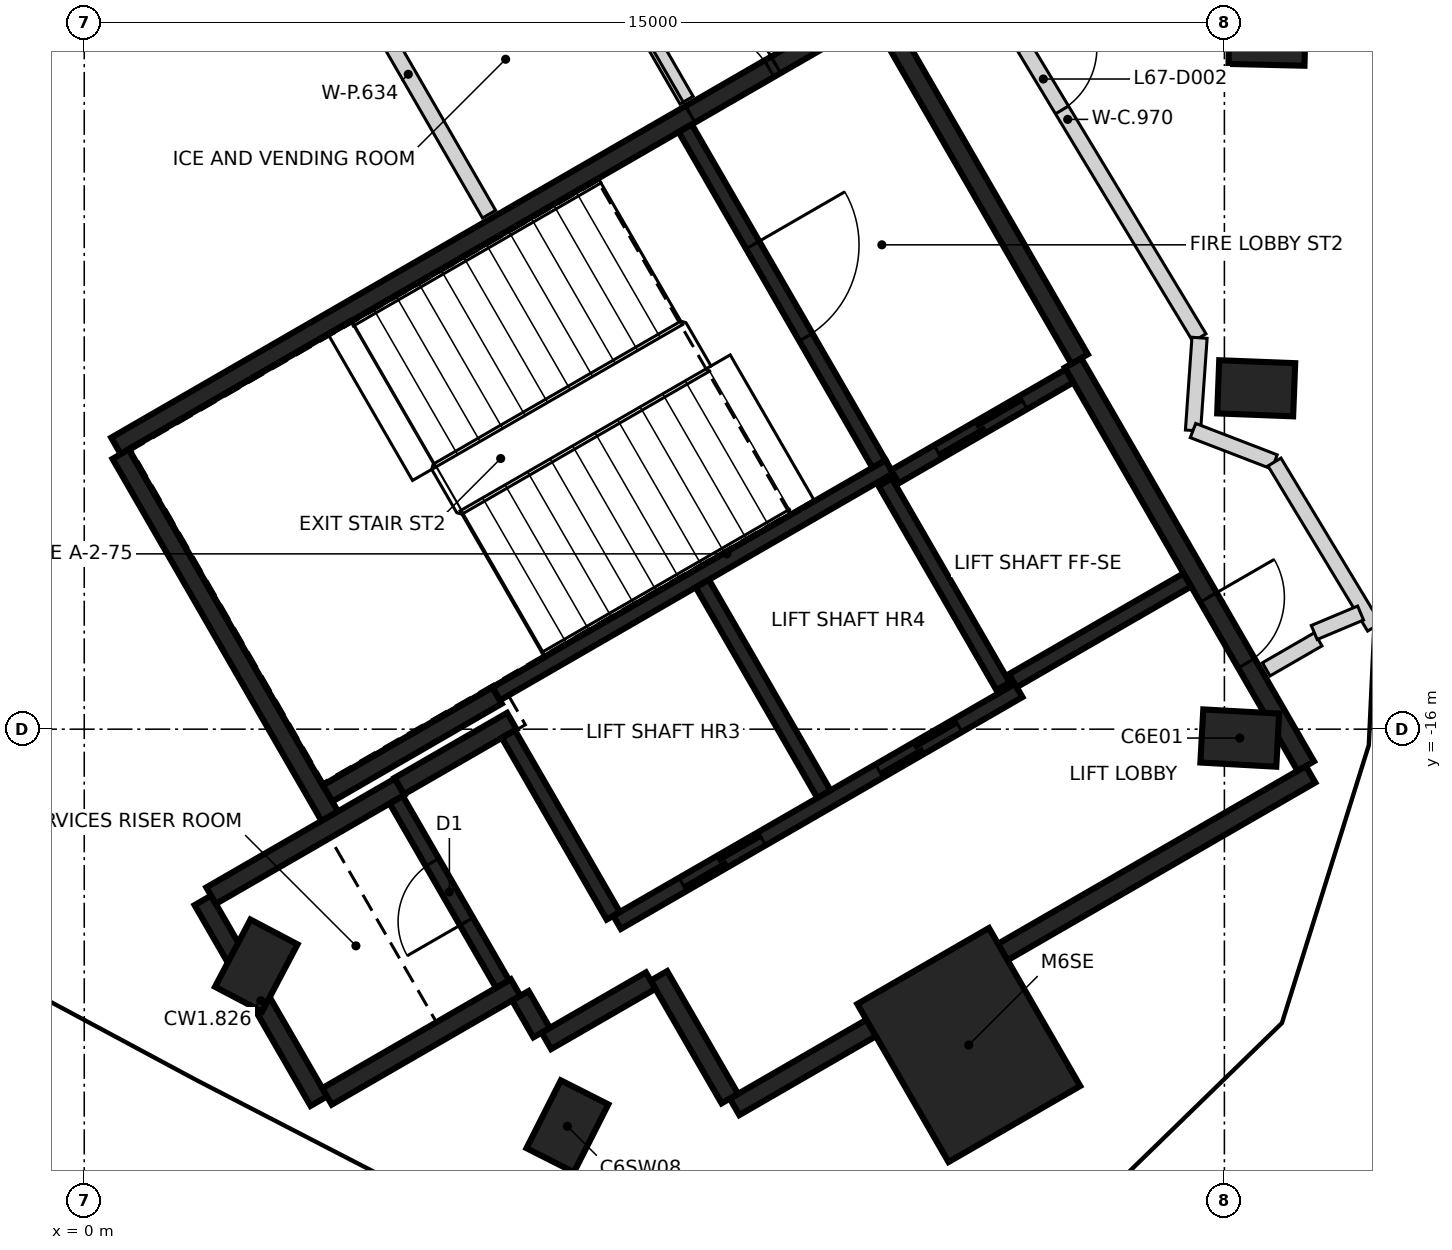
"""IFC4 building model, lengths in metres.
Left out: names, types, materials, properties, quantities, classifications, styles, units other than length and angle.
Written with IfcOpenShell. Run it as: python <this file> out.ifc"""

import sys

from ifc_helpers import new_model, si_unit, direction, frame, frame_2d, origin, origin_2d, place, context, subcontext, project, spatial, rectangle, extrude, element, fill, save


model = new_model("IFC4")
c1 = context("Model", 3, precision=1e-05, world=origin(), true_north=direction((0.0, 1.0)))
c2 = subcontext(c1, "Body", "Model", "MODEL_VIEW")
j1 = project(units=[si_unit("LENGTHUNIT", "METRE"), si_unit("PLANEANGLEUNIT", "RADIAN")], contexts=[c1])
p1 = place(None, origin())
s1 = spatial("IfcSite", under=j1, at=p1, CompositionType="ELEMENT")
p2 = place(p1, origin())
s2 = spatial("IfcBuilding", under=s1, at=p2, CompositionType="ELEMENT")
p3 = place(p2, frame((0.0, 0.0, 265.8)))
s3 = spatial("IfcBuildingStorey", under=s2, at=p3, CompositionType="ELEMENT", Elevation=265.8)
for number, where, z_axis, x_axis in (
    (1, (15.202, -16.117, -0.35), (0.0, 0.0, 1.0), (-0.998, 0.055, 0.0)),
    (2, (15.418, -11.515, -0.35), (0.0, 0.0, 1.0), (-0.999, 0.039, 0.0)),
    (3, (15.562, -6.91, -0.35), (0.0, 0.0, 1.0), (-1.0, 0.024, 0.0)),
    (4, (2.263, -19.11, -0.35), (0.0, 0.0, 1.0), (0.466, 0.885, 0.0)),
    (5, (6.356, -21.224, -0.35), (0.0, 0.0, 1.0), (0.452, 0.892, 0.0)),
):
    element("IfcColumn", number, at=place(p3, frame(where, z_axis=z_axis, x_axis=x_axis)), inside=s3, PredefinedType="COLUMN", context=c2, shape_type="SweptSolid", body=[
        extrude(rectangle(XDim=1.0, YDim=0.7, at=origin_2d()), origin(), (0.0, 0.0, 1.0), 3.6),
    ])
p4 = place(p3, frame((11.637, -20.155, -0.35), z_axis=(0.0, 0.0, 1.0), x_axis=(-0.5, 0.866025403784, 0.0)))
e6 = element("IfcColumn", 6, at=p4, inside=s3, PredefinedType="COLUMN", context=c2, shape_type="SweptSolid", body=[
    extrude(rectangle(XDim=2.4, YDim=2.0, at=origin_2d()), origin(), (0.0, 0.0, 1.0), 3.6),
])
p5 = place(p3, frame((0.417, -12.273, 0.0), z_axis=(0.0, 0.0, 1.0), x_axis=(0.866021906294, 0.500006057782, 0.0)))
e7 = element("IfcWall", 7, at=p5, inside=s3, PredefinedType="SHEAR", context=c2, shape_type="SweptSolid", body=[
    extrude(rectangle(XDim=11.55, YDim=0.25, at=frame_2d((5.775, 0.0))), origin(), (0.0, 0.0, 1.0), 3.25),
])
p6 = place(p5, frame((10.025, 0.0, 0.0)))
e8 = element("IfcOpeningElement", 8, at=p6, cuts=e7, PredefinedType="OPENING", context=c2, shape_type="SweptSolid", body=[
    extrude(rectangle(XDim=1.2, YDim=2.1, at=frame_2d((0.6, 1.05))), frame((0.0, 0.135, 0.0), z_axis=(0.0, -1.0, 0.0), x_axis=(1.0, 0.0, 0.0)), (0.0, 0.0, 1.0), 0.27),
])
p7 = place(p5, frame((8.725, 0.0, 0.0)))
e9 = element("IfcOpeningElement", 9, at=p7, cuts=e7, PredefinedType="OPENING", context=c2, shape_type="SweptSolid", body=[
    extrude(rectangle(XDim=1.2, YDim=2.1, at=frame_2d((0.6, 1.05))), frame((0.0, 0.135, 0.0), z_axis=(0.0, -1.0, 0.0), x_axis=(1.0, 0.0, 0.0)), (0.0, 0.0, 1.0), 0.27),
])
p8 = place(p3, frame((16.133, -16.594, 0.0), z_axis=(0.0, 0.0, 1.0), x_axis=(-0.866022959057, -0.500004234368, 0.0)))
e10 = element("IfcWall", 10, at=p8, inside=s3, PredefinedType="SHEAR", context=c2, shape_type="SweptSolid", body=[
    extrude(rectangle(XDim=8.75, YDim=0.25, at=frame_2d((4.375, 0.0))), origin(), (0.0, 0.0, 1.0), 3.25),
])
p9 = place(p3, frame((13.008, -11.181, 0.0), z_axis=(0.0, 0.0, 1.0), x_axis=(0.500001955336, -0.866024274868, 0.0)))
e11 = element("IfcWall", 11, at=p9, inside=s3, PredefinedType="SHEAR", context=c2, shape_type="SweptSolid", body=[
    extrude(rectangle(XDim=6.125, YDim=0.25, at=frame_2d((3.062, 0.0))), origin(), (0.0, 0.0, 1.0), 3.25),
])
p10 = place(p9, frame((3.563, 0.0, 0.0)))
e12 = element("IfcOpeningElement", 12, at=p10, cuts=e11, PredefinedType="OPENING", context=c2, shape_type="SweptSolid", body=[
    extrude(rectangle(XDim=1.0, YDim=2.1, at=frame_2d((0.5, 1.05))), frame((0.0, 0.135, 0.0), z_axis=(0.0, -1.0, 0.0), x_axis=(1.0, 0.0, 0.0)), (0.0, 0.0, 1.0), 0.27),
])
p11 = place(p3, frame((3.235, -17.153, 0.0), z_axis=(0.0, 0.0, 1.0), x_axis=(-0.500008851346, 0.866020293397, 0.0)))
e13 = element("IfcWall", 13, at=p11, inside=s3, PredefinedType="SHEAR", context=c2, shape_type="SweptSolid", body=[
    extrude(rectangle(XDim=5.51, YDim=0.25, at=frame_2d((2.755, 0.0))), origin(), (0.0, 0.0, 1.0), 3.25),
])
p12 = place(p3, frame((10.483, -6.606, 0.0), z_axis=(0.0, 0.0, 1.0), x_axis=(0.49999885962, -0.866026062182, 0.0)))
e14 = element("IfcWall", 14, at=p12, inside=s3, PredefinedType="SHEAR", context=c2, shape_type="SweptSolid", body=[
    extrude(rectangle(XDim=5.225, YDim=0.25, at=frame_2d((2.612, 0.0))), origin(), (0.0, 0.0, 1.0), 3.25),
])
p13 = place(p3, frame((3.085, -20.894, 0.0), z_axis=(0.0, 0.0, 1.0), x_axis=(-0.499978833458, 0.866037623948, 0.0)))
e15 = element("IfcWall", 15, at=p13, inside=s3, PredefinedType="SHEAR", context=c2, shape_type="SweptSolid", body=[
    extrude(rectangle(XDim=3.05, YDim=0.25, at=frame_2d((1.525, 0.0))), origin(), (0.0, 0.0, 1.0), 3.25),
])
p14 = place(p3, frame((1.669, -18.19, 0.0), z_axis=(0.0, 0.0, 1.0), x_axis=(0.866042235819, 0.499970844928, 0.0)))
e16 = element("IfcWall", 16, at=p14, inside=s3, PredefinedType="SHEAR", context=c2, shape_type="SweptSolid", body=[
    extrude(rectangle(XDim=2.865, YDim=0.25, at=frame_2d((1.432, 0.0))), origin(), (0.0, 0.0, 1.0), 3.25),
])
p15 = place(p3, frame((5.675, -19.399, 0.0), z_axis=(0.0, 0.0, 1.0), x_axis=(-0.866026637627, -0.499997862916, 0.0)))
e17 = element("IfcWall", 17, at=p15, inside=s3, PredefinedType="SHEAR", context=c2, shape_type="SweptSolid", body=[
    extrude(rectangle(XDim=2.865, YDim=0.25, at=frame_2d((1.432, 0.0))), origin(), (0.0, 0.0, 1.0), 3.25),
])
p16 = place(p3, frame((5.431, -15.556, 0.0), z_axis=(0.0, 0.0, 1.0), x_axis=(-0.866022940537, -0.500004266446, 0.0)))
e18 = element("IfcWall", 18, at=p16, inside=s3, PredefinedType="SHEAR", context=c2, shape_type="SweptSolid", body=[
    extrude(rectangle(XDim=2.575, YDim=0.25, at=frame_2d((1.287, 0.0))), origin(), (0.0, 0.0, 1.0), 3.25),
])
p17 = place(p3, frame((8.493, -20.86, 0.0), z_axis=(0.0, 0.0, 1.0), x_axis=(-0.500039802285, 0.866002422705, 0.0)))
e19 = element("IfcWall", 19, at=p17, inside=s3, PredefinedType="SHEAR", context=c2, shape_type="SweptSolid", body=[
    extrude(rectangle(XDim=1.865, YDim=0.25, at=frame_2d((0.932, 0.0))), origin(), (0.0, 0.0, 1.0), 3.25),
])
p18 = place(p3, frame((4.145, -16.749, 0.0), z_axis=(0.0, 0.0, 1.0), x_axis=(0.866038183914, 0.499977863513, 0.0)))
e20 = element("IfcWall", 20, at=p18, inside=s3, PredefinedType="SHEAR", context=c2, shape_type="SweptSolid", body=[
    extrude(rectangle(XDim=1.71, YDim=0.25, at=frame_2d((0.855, 0.0))), origin(), (0.0, 0.0, 1.0), 3.25),
])
p19 = place(p3, frame((7.452, -19.308, 0.0), z_axis=(0.0, 0.0, 1.0), x_axis=(-0.866044474677, -0.49996696679, 0.0)))
e21 = element("IfcWall", 21, at=p19, inside=s3, PredefinedType="SHEAR", context=c2, shape_type="SweptSolid", body=[
    extrude(rectangle(XDim=1.584, YDim=0.25, at=frame_2d((0.792, 0.0))), origin(), (0.0, 0.0, 1.0), 3.25),
])
p20 = place(p3, frame((6.017, -19.992, 0.0), z_axis=(0.0, 0.0, 1.0), x_axis=(-0.500364886717, 0.865814633822, 0.0)))
e22 = element("IfcWall", 22, at=p20, inside=s3, PredefinedType="SHEAR", context=c2, shape_type="SweptSolid", body=[
    extrude(rectangle(XDim=0.559, YDim=0.25, at=frame_2d((0.28, 0.0))), origin(), (0.0, 0.0, 1.0), 3.25),
])
p21 = place(p3, frame((5.419, -15.534, 0.0), z_axis=(0.0, 0.0, 1.0), x_axis=(0.866029065029, 0.499993658486, 0.0)))
e23 = element("IfcWall", 23, at=p21, inside=s3, PredefinedType="SHEAR", context=c2, shape_type="SweptSolid", body=[
    extrude(rectangle(XDim=5.974, YDim=0.2, at=frame_2d((2.987, 0.0))), origin(), (0.0, 0.0, 1.0), 3.25),
])
p22 = place(p3, frame((7.01, -18.542, 0.0), z_axis=(0.0, 0.0, 1.0), x_axis=(0.866030299012, 0.499991521122, 0.0)))
e24 = element("IfcWall", 24, at=p22, inside=s3, PredefinedType="SHEAR", context=c2, shape_type="SweptSolid", body=[
    extrude(rectangle(XDim=6.1, YDim=0.2, at=frame_2d((3.05, 0.0))), origin(), (0.0, 0.0, 1.0), 3.25),
])
p23 = place(p22, frame((1.0, 0.0, 0.0)))
e25 = element("IfcOpeningElement", 25, at=p23, cuts=e24, PredefinedType="OPENING", context=c2, shape_type="SweptSolid", body=[
    extrude(rectangle(XDim=1.2, YDim=2.1, at=frame_2d((0.6, 1.05))), frame((0.0, 0.11, 0.0), z_axis=(0.0, -1.0, 0.0), x_axis=(1.0, 0.0, 0.0)), (0.0, 0.0, 1.0), 0.22),
])
p24 = place(p22, frame((3.982, 0.0, 0.0)))
e26 = element("IfcOpeningElement", 26, at=p24, cuts=e24, PredefinedType="OPENING", context=c2, shape_type="SweptSolid", body=[
    extrude(rectangle(XDim=1.2, YDim=2.1, at=frame_2d((0.6, 1.05))), frame((0.0, 0.11, 0.0), z_axis=(0.0, -1.0, 0.0), x_axis=(1.0, 0.0, 0.0)), (0.0, 0.0, 1.0), 0.22),
])
p25 = place(p3, frame((7.906, -8.094, 0.0), z_axis=(0.0, 0.0, 1.0), x_axis=(0.500027839223, -0.866009330205, 0.0)))
e27 = element("IfcWall", 27, at=p25, inside=s3, PredefinedType="SHEAR", context=c2, shape_type="SweptSolid", body=[
    extrude(rectangle(XDim=5.098, YDim=0.2, at=frame_2d((2.549, 0.0))), origin(), (0.0, 0.0, 1.0), 3.25),
])
p26 = place(p25, frame((1.774, 0.0, 0.0)))
e28 = element("IfcOpeningElement", 28, at=p26, cuts=e27, PredefinedType="OPENING", context=c2, shape_type="SweptSolid", body=[
    extrude(rectangle(XDim=1.4, YDim=2.1, at=frame_2d((0.7, 1.05))), frame((0.0, 0.11, 0.0), z_axis=(0.0, -1.0, 0.0), x_axis=(1.0, 0.0, 0.0)), (0.0, 0.0, 1.0), 0.22),
])
p27 = place(p3, frame((8.132, -14.084, 0.0), z_axis=(0.0, 0.0, 1.0), x_axis=(0.499997778408, -0.866026686418, 0.0)))
e29 = element("IfcWall", 29, at=p27, inside=s3, PredefinedType="SHEAR", context=c2, shape_type="SweptSolid", body=[
    extrude(rectangle(XDim=3.198, YDim=0.2, at=frame_2d((1.599, 0.0))), origin(), (0.0, 0.0, 1.0), 3.25),
])
p28 = place(p3, frame((5.503, -19.352, 0.0), z_axis=(0.0, 0.0, 1.0), x_axis=(-0.499986818241, 0.866033014143, 0.0)))
e30 = element("IfcWall", 30, at=p28, inside=s3, PredefinedType="SHEAR", context=c2, shape_type="SweptSolid", body=[
    extrude(rectangle(XDim=2.798, YDim=0.2, at=frame_2d((1.399, 0.0))), origin(), (0.0, 0.0, 1.0), 3.25),
])
p29 = place(p28, frame((0.949, 0.0, 0.0)))
e31 = element("IfcOpeningElement", 31, at=p29, cuts=e30, PredefinedType="OPENING", context=c2, shape_type="SweptSolid", body=[
    extrude(rectangle(XDim=0.9, YDim=2.1, at=frame_2d((0.45, 1.05))), frame((0.0, 0.11, 0.0), z_axis=(0.0, -1.0, 0.0), x_axis=(1.0, 0.0, 0.0)), (0.0, 0.0, 1.0), 0.22),
])
p30 = place(p3, frame((6.96, -18.455, 0.0), z_axis=(0.0, 0.0, 1.0), x_axis=(-0.499926705758, 0.866067716099, 0.0)))
e32 = element("IfcWall", 32, at=p30, inside=s3, PredefinedType="SHEAR", context=c2, shape_type="SweptSolid", body=[
    extrude(rectangle(XDim=2.759, YDim=0.2, at=frame_2d((1.38, 0.0))), origin(), (0.0, 0.0, 1.0), 3.25),
])
p31 = place(p3, frame((12.088, -15.437, 0.0), z_axis=(0.0, 0.0, 1.0), x_axis=(-0.500026960575, 0.86600983753, 0.0)))
e33 = element("IfcWall", 33, at=p31, inside=s3, PredefinedType="SHEAR", context=c2, shape_type="SweptSolid", body=[
    extrude(rectangle(XDim=3.1, YDim=0.2, at=frame_2d((1.55, 0.0))), origin(), (0.0, 0.0, 1.0), 3.25),
])
p32 = place(p3, frame((10.666, -12.678, 0.0), z_axis=(0.0, 0.0, 1.0), x_axis=(0.866018407898, 0.500012117035, 0.0)))
e34 = element("IfcWall", 34, at=p32, inside=s3, PredefinedType="SHEAR", context=c2, shape_type="SweptSolid", body=[
    extrude(rectangle(XDim=2.651, YDim=0.2, at=frame_2d((1.325, 0.0))), origin(), (0.0, 0.0, 1.0), 3.25),
])
p33 = place(p32, frame((0.652, 0.0, 0.0)))
e35 = element("IfcOpeningElement", 35, at=p33, cuts=e34, PredefinedType="OPENING", context=c2, shape_type="SweptSolid", body=[
    extrude(rectangle(XDim=1.3, YDim=2.1, at=frame_2d((0.65, 1.05))), frame((0.0, 0.11, 0.0), z_axis=(0.0, -1.0, 0.0), x_axis=(1.0, 0.0, 0.0)), (0.0, 0.0, 1.0), 0.22),
])
p34 = place(p3, frame((14.512, -14.037, 0.0), z_axis=(0.0, 0.0, 1.0), x_axis=(-0.866018407898, -0.500012117035, 0.0)))
e36 = element("IfcWall", 36, at=p34, inside=s3, PredefinedType="SHEAR", context=c2, shape_type="SweptSolid", body=[
    extrude(rectangle(XDim=2.651, YDim=0.2, at=frame_2d((1.325, 0.0))), origin(), (0.0, 0.0, 1.0), 3.25),
])
p35 = place(p3, frame((7.427, -6.864, 0.0), z_axis=(0.0, 0.0, 1.0), x_axis=(0.499942098031, -0.866058830921, 0.0)))
e37 = element("IfcWall", 37, at=p35, inside=s3, PredefinedType="PARTITIONING", context=c2, shape_type="SweptSolid", body=[
    extrude(rectangle(XDim=0.994, YDim=0.2, at=frame_2d((0.497, 0.0))), origin(), (0.0, 0.0, 1.0), 3.25),
])
p36 = place(p3, frame((11.205, -5.105, 0.0), z_axis=(0.0, 0.0, 1.0), x_axis=(0.516682442017, -0.856177116087, 0.0)))
e38 = element("IfcWall", 38, at=p36, inside=s3, PredefinedType="PARTITIONING", context=c2, shape_type="SweptSolid", body=[
    extrude(rectangle(XDim=6.71, YDim=0.2, at=frame_2d((3.355, 0.0))), origin(), (0.0, 0.0, 1.0), 3.25),
])
p37 = place(p36, frame((2.26, 0.0, 0.0)))
e39 = element("IfcOpeningElement", 39, at=p37, cuts=e38, PredefinedType="OPENING", context=c2, shape_type="SweptSolid", body=[
    extrude(rectangle(XDim=0.95, YDim=2.1, at=frame_2d((0.475, 1.05))), frame((0.0, 0.11, 0.0), z_axis=(0.0, -1.0, 0.0), x_axis=(1.0, 0.0, 0.0)), (0.0, 0.0, 1.0), 0.22),
])
p38 = place(p3, frame((14.587, -12.071, 0.0), z_axis=(0.0, 0.0, 1.0), x_axis=(0.070466777423, 0.997514126857, 0.0)))
e40 = element("IfcWall", 40, at=p38, inside=s3, PredefinedType="PARTITIONING", context=c2, shape_type="SweptSolid", body=[
    extrude(rectangle(XDim=1.223, YDim=0.2, at=frame_2d((0.611, 0.0))), origin(), (0.0, 0.0, 1.0), 3.25),
])
p39 = place(p3, frame((14.587, -12.071, 0.0), z_axis=(0.0, 0.0, 1.0), x_axis=(0.933192153307, -0.359377802606, 0.0)))
e41 = element("IfcWall", 41, at=p39, inside=s3, PredefinedType="PARTITIONING", context=c2, shape_type="SweptSolid", body=[
    extrude(rectangle(XDim=1.149, YDim=0.2, at=frame_2d((0.574, 0.0))), origin(), (0.0, 0.0, 1.0), 2.35),
])
p40 = place(p3, frame((15.55, -15.213, 0.0), z_axis=(0.0, 0.0, 1.0), x_axis=(0.865989998118, 0.500061319399, 0.0)))
e42 = element("IfcWall", 42, at=p40, inside=s3, PredefinedType="PARTITIONING", context=c2, shape_type="SweptSolid", body=[
    extrude(rectangle(XDim=0.79, YDim=0.2, at=frame_2d((0.395, 0.0))), origin(), (0.0, 0.0, 1.0), 3.25),
])
p41 = place(p3, frame((15.659, -12.485, 0.0), z_axis=(0.0, 0.0, 1.0), x_axis=(0.516729412104, -0.856148769003, 0.0)))
e43 = element("IfcWall", 43, at=p41, inside=s3, PredefinedType="PARTITIONING", context=c2, shape_type="SweptSolid", body=[
    extrude(rectangle(XDim=2.538, YDim=0.2, at=frame_2d((1.269, 0.0))), origin(), (0.0, 0.0, 1.0), 3.25),
])
p42 = place(p3, frame((16.182, -14.728, 0.0), z_axis=(0.0, 0.0, 1.0), x_axis=(0.922058491377, 0.387050563207, 0.0)))
e44 = element("IfcWall", 44, at=p42, inside=s3, PredefinedType="PARTITIONING", context=c2, shape_type="SweptSolid", body=[
    extrude(rectangle(XDim=0.662, YDim=0.2, at=frame_2d((0.331, 0.0))), origin(), (0.0, 0.0, 1.0), 3.25),
])
p43 = place(p3, frame((3.2, -5.543, 0.0), z_axis=(0.0, 0.0, 1.0), x_axis=(0.500060428066, -0.865990512813, 0.0)))
e45 = element("IfcWall", 45, at=p43, inside=s3, PredefinedType="PARTITIONING", context=c2, shape_type="SweptSolid", body=[
    extrude(rectangle(XDim=4.252, YDim=0.2, at=frame_2d((2.126, 0.0))), origin(), (0.0, 0.0, 1.0), 3.25),
])
p44 = place(p33, origin())
e46 = element("IfcDoor", 46, at=p44, inside=s3, OperationType="SLIDING_TO_LEFT", PredefinedType="DOOR", context=c2, shape_type="SweptSolid", body=[
    extrude(rectangle(XDim=1.3, YDim=2.1, at=frame_2d((0.65, 1.05))), frame((0.0, 0.025, 0.0), z_axis=(0.0, -1.0, 0.0), x_axis=(1.0, 0.0, 0.0)), (0.0, 0.0, 1.0), 0.05),
])
fill(e35, e46)
p45 = place(p23, origin())
e47 = element("IfcDoor", 47, at=p45, inside=s3, OperationType="DOUBLE_DOOR_SLIDING", PredefinedType="DOOR", context=c2, shape_type="SweptSolid", body=[
    extrude(rectangle(XDim=1.2, YDim=2.1, at=frame_2d((0.6, 1.05))), frame((0.0, 0.025, 0.0), z_axis=(0.0, -1.0, 0.0), x_axis=(1.0, 0.0, 0.0)), (0.0, 0.0, 1.0), 0.05),
])
fill(e25, e47)
p46 = place(p24, origin())
e48 = element("IfcDoor", 48, at=p46, inside=s3, OperationType="DOUBLE_DOOR_SLIDING", PredefinedType="DOOR", context=c2, shape_type="SweptSolid", body=[
    extrude(rectangle(XDim=1.2, YDim=2.1, at=frame_2d((0.6, 1.05))), frame((0.0, 0.025, 0.0), z_axis=(0.0, -1.0, 0.0), x_axis=(1.0, 0.0, 0.0)), (0.0, 0.0, 1.0), 0.05),
])
fill(e26, e48)
p47 = place(p10, origin())
e49 = element("IfcDoor", 49, at=p47, inside=s3, OperationType="SINGLE_SWING_LEFT", PredefinedType="DOOR", context=c2, shape_type="SweptSolid", body=[
    extrude(rectangle(XDim=1.0, YDim=2.1, at=frame_2d((0.5, 1.05))), frame((0.0, 0.025, 0.0), z_axis=(0.0, -1.0, 0.0), x_axis=(1.0, 0.0, 0.0)), (0.0, 0.0, 1.0), 0.05),
])
fill(e12, e49)
p48 = place(p6, origin())
e50 = element("IfcDoor", 50, at=p48, inside=s3, OperationType="SINGLE_SWING_LEFT", PredefinedType="DOOR", context=c2, shape_type="SweptSolid", body=[
    extrude(rectangle(XDim=1.2, YDim=2.1, at=frame_2d((0.6, 1.05))), frame((0.0, 0.025, 0.0), z_axis=(0.0, -1.0, 0.0), x_axis=(1.0, 0.0, 0.0)), (0.0, 0.0, 1.0), 0.05),
])
fill(e8, e50)
p49 = place(p7, origin())
e51 = element("IfcDoor", 51, at=p49, inside=s3, OperationType="SINGLE_SWING_RIGHT", PredefinedType="DOOR", context=c2, shape_type="SweptSolid", body=[
    extrude(rectangle(XDim=1.2, YDim=2.1, at=frame_2d((0.6, 1.05))), frame((0.0, 0.025, 0.0), z_axis=(0.0, -1.0, 0.0), x_axis=(1.0, 0.0, 0.0)), (0.0, 0.0, 1.0), 0.05),
])
fill(e9, e51)
p50 = place(p26, origin())
e52 = element("IfcDoor", 52, at=p50, inside=s3, OperationType="SINGLE_SWING_LEFT", PredefinedType="DOOR", context=c2, shape_type="SweptSolid", body=[
    extrude(rectangle(XDim=1.4, YDim=2.1, at=frame_2d((0.7, 1.05))), frame((0.0, 0.025, 0.0), z_axis=(0.0, -1.0, 0.0), x_axis=(1.0, 0.0, 0.0)), (0.0, 0.0, 1.0), 0.05),
])
fill(e28, e52)
p51 = place(p29, origin())
e53 = element("IfcDoor", 53, at=p51, inside=s3, OperationType="SINGLE_SWING_RIGHT", PredefinedType="DOOR", context=c2, shape_type="SweptSolid", body=[
    extrude(rectangle(XDim=0.9, YDim=2.1, at=frame_2d((0.45, 1.05))), frame((0.0, 0.025, 0.0), z_axis=(0.0, -1.0, 0.0), x_axis=(1.0, 0.0, 0.0)), (0.0, 0.0, 1.0), 0.05),
])
fill(e31, e53)
p52 = place(p37, origin())
e54 = element("IfcDoor", 54, at=p52, inside=s3, OperationType="SINGLE_SWING_LEFT", PredefinedType="DOOR", context=c2, shape_type="SweptSolid", body=[
    extrude(rectangle(XDim=0.95, YDim=2.1, at=frame_2d((0.475, 1.05))), frame((0.0, 0.025, 0.0), z_axis=(0.0, -1.0, 0.0), x_axis=(1.0, 0.0, 0.0)), (0.0, 0.0, 1.0), 0.05),
])
fill(e39, e54)
save(model, sys.argv[1])
